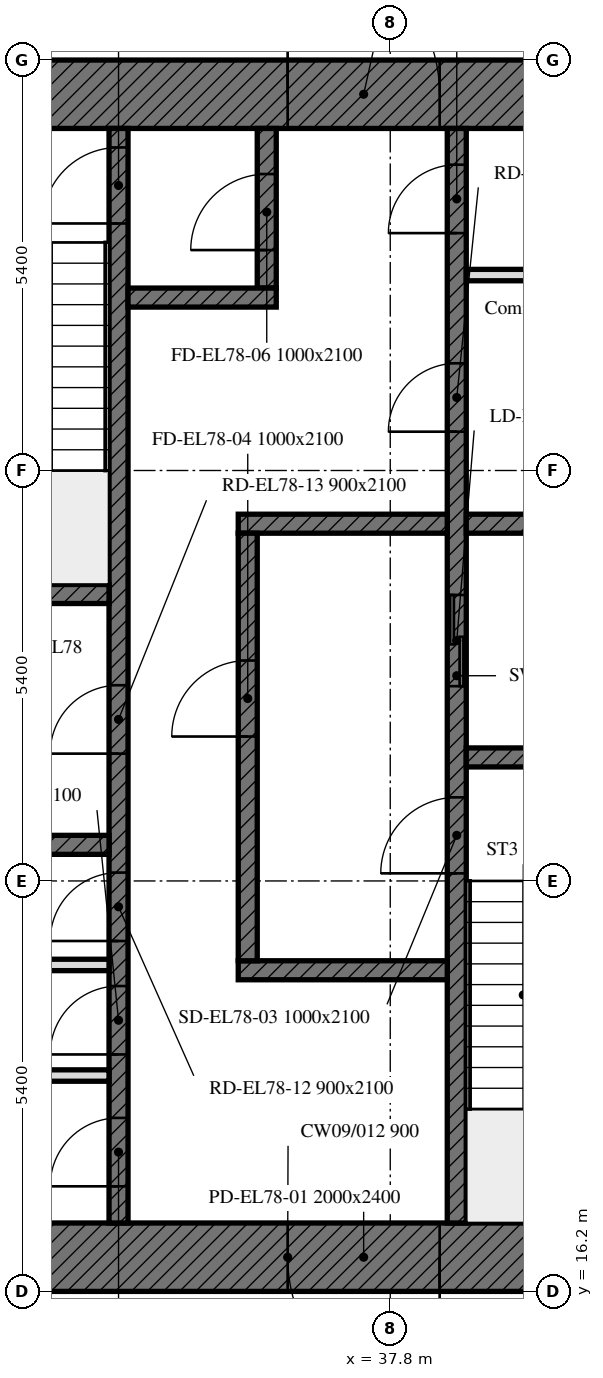
"""IFC4 building model, lengths in metres.
Left out: names, types, materials, properties, quantities, classifications, styles, units other than length and angle.
Written with IfcOpenShell. Run it as: python <this file> out.ifc"""

import sys

from ifc_helpers import new_model, si_unit, direction, frame, frame_2d, origin, place, context, subcontext, project, spatial, rectangle, extrude, element, fill, save


model = new_model("IFC4")
c1 = context("Model", 3, precision=1e-05, world=origin(), true_north=direction((0.0, 1.0)))
c2 = subcontext(c1, "Body", "Model", "MODEL_VIEW")
j1 = project(units=[si_unit("LENGTHUNIT", "METRE"), si_unit("PLANEANGLEUNIT", "RADIAN")], contexts=[c1])
p1 = place(None, origin())
s1 = spatial("IfcSite", under=j1, at=p1, CompositionType="ELEMENT")
p2 = place(p1, origin())
s2 = spatial("IfcBuilding", under=s1, at=p2, CompositionType="ELEMENT")
p3 = place(p2, frame((0.0, 0.0, 312.7)))
s3 = spatial("IfcBuildingStorey", under=s2, at=p3, CompositionType="ELEMENT", Elevation=312.7)
p4 = place(p3, frame((42.0, 16.65, 0.0), z_axis=(0.0, 0.0, 1.0), x_axis=(-1.0, 0.0, 0.0)))
e1 = element("IfcWall", 1, at=p4, inside=s3, PredefinedType="SOLIDWALL", context=c2, shape_type="SweptSolid", body=[
    extrude(rectangle(XDim=11.1, YDim=0.9, at=frame_2d((5.55, 0.0))), origin(), (0.0, 0.0, 1.0), 4.2),
])
p5 = place(p4, frame((3.55, 0.0, 0.0)))
e2 = element("IfcOpeningElement", 2, at=p5, cuts=e1, PredefinedType="OPENING", context=c2, shape_type="SweptSolid", body=[
    extrude(rectangle(XDim=2.0, YDim=2.4, at=frame_2d((1.0, 1.2))), frame((0.0, 0.45, 0.0), z_axis=(0.0, -1.0, 0.0), x_axis=(1.0, 0.0, 0.0)), (0.0, 0.0, 1.0), 0.9),
])
p6 = place(p3, frame((30.9, 31.95, 0.0), z_axis=(0.0, 0.0, 1.0), x_axis=(1.0, 0.0, 0.0)))
e3 = element("IfcWall", 3, at=p6, inside=s3, PredefinedType="SOLIDWALL", context=c2, shape_type="SweptSolid", body=[
    extrude(rectangle(XDim=11.1, YDim=0.9, at=frame_2d((5.55, 0.0))), origin(), (0.0, 0.0, 1.0), 4.2),
])
p7 = place(p6, frame((5.55, 0.0, 0.0)))
e4 = element("IfcOpeningElement", 4, at=p7, cuts=e3, PredefinedType="OPENING", context=c2, shape_type="SweptSolid", body=[
    extrude(rectangle(XDim=2.0, YDim=2.4, at=frame_2d((1.0, 1.2))), frame((0.0, 0.45, 0.0), z_axis=(0.0, -1.0, 0.0), x_axis=(1.0, 0.0, 0.0)), (0.0, 0.0, 1.0), 0.9),
])
p8 = place(p3, frame((38.675, 17.1, 0.0), z_axis=(0.0, 0.0, 1.0), x_axis=(0.0, 1.0, 0.0)))
e5 = element("IfcWall", 5, at=p8, inside=s3, PredefinedType="SOLIDWALL", context=c2, shape_type="SweptSolid", body=[
    extrude(rectangle(XDim=14.4, YDim=0.25, at=frame_2d((7.2, 0.0))), origin(), (0.0, 0.0, 1.0), 4.2),
])
p9 = place(p8, frame((4.6, 0.0, 0.0)))
e6 = element("IfcOpeningElement", 6, at=p9, cuts=e5, PredefinedType="OPENING", context=c2, shape_type="SweptSolid", body=[
    extrude(rectangle(XDim=1.0, YDim=2.1, at=frame_2d((0.5, 1.05))), frame((0.0, 0.125, 0.0), z_axis=(0.0, -1.0, 0.0), x_axis=(1.0, 0.0, 0.0)), (0.0, 0.0, 1.0), 0.25),
])
p10 = place(p8, frame((7.062, 0.0, 0.0)))
e7 = element("IfcOpeningElement", 7, at=p10, cuts=e5, PredefinedType="OPENING", context=c2, shape_type="SweptSolid", body=[
    extrude(rectangle(XDim=1.2, YDim=2.1, at=frame_2d((0.6, 1.05))), frame((0.0, 0.125, 0.0), z_axis=(0.0, -1.0, 0.0), x_axis=(1.0, 0.0, 0.0)), (0.0, 0.0, 1.0), 0.25),
])
p11 = place(p8, frame((10.41, 0.0, 0.0)))
e8 = element("IfcOpeningElement", 8, at=p11, cuts=e5, PredefinedType="OPENING", context=c2, shape_type="SweptSolid", body=[
    extrude(rectangle(XDim=0.9, YDim=2.1, at=frame_2d((0.45, 1.05))), frame((0.0, 0.125, 0.0), z_axis=(0.0, -1.0, 0.0), x_axis=(1.0, 0.0, 0.0)), (0.0, 0.0, 1.0), 0.25),
])
p12 = place(p8, frame((13.023, 0.0, 0.0)))
e9 = element("IfcOpeningElement", 9, at=p12, cuts=e5, PredefinedType="OPENING", context=c2, shape_type="SweptSolid", body=[
    extrude(rectangle(XDim=0.9, YDim=2.1, at=frame_2d((0.45, 1.05))), frame((0.0, 0.125, 0.0), z_axis=(0.0, -1.0, 0.0), x_axis=(1.0, 0.0, 0.0)), (0.0, 0.0, 1.0), 0.25),
])
p13 = place(p3, frame((34.225, 17.1, 0.0), z_axis=(0.0, 0.0, 1.0), x_axis=(0.0, 1.0, 0.0)))
e10 = element("IfcWall", 10, at=p13, inside=s3, PredefinedType="SOLIDWALL", context=c2, shape_type="SweptSolid", body=[
    extrude(rectangle(XDim=14.4, YDim=0.25, at=frame_2d((7.2, 0.0))), origin(), (0.0, 0.0, 1.0), 4.2),
])
p14 = place(p13, frame((13.15, 0.0, 0.0)))
e11 = element("IfcOpeningElement", 11, at=p14, cuts=e10, PredefinedType="OPENING", context=c2, shape_type="SweptSolid", body=[
    extrude(rectangle(XDim=1.0, YDim=2.1, at=frame_2d((0.5, 1.05))), frame((0.0, 0.125, 0.0), z_axis=(0.0, -1.0, 0.0), x_axis=(1.0, 0.0, 0.0)), (0.0, 0.0, 1.0), 0.25),
])
p15 = place(p13, frame((0.482, 0.0, 0.0)))
e12 = element("IfcOpeningElement", 12, at=p15, cuts=e10, PredefinedType="OPENING", context=c2, shape_type="SweptSolid", body=[
    extrude(rectangle(XDim=0.9, YDim=2.1, at=frame_2d((0.45, 1.05))), frame((0.0, 0.125, 0.0), z_axis=(0.0, -1.0, 0.0), x_axis=(1.0, 0.0, 0.0)), (0.0, 0.0, 1.0), 0.25),
])
p16 = place(p13, frame((2.218, 0.0, 0.0)))
e13 = element("IfcOpeningElement", 13, at=p16, cuts=e10, PredefinedType="OPENING", context=c2, shape_type="SweptSolid", body=[
    extrude(rectangle(XDim=0.9, YDim=2.1, at=frame_2d((0.45, 1.05))), frame((0.0, 0.125, 0.0), z_axis=(0.0, -1.0, 0.0), x_axis=(1.0, 0.0, 0.0)), (0.0, 0.0, 1.0), 0.25),
])
p17 = place(p13, frame((3.71, 0.0, 0.0)))
e14 = element("IfcOpeningElement", 14, at=p17, cuts=e10, PredefinedType="OPENING", context=c2, shape_type="SweptSolid", body=[
    extrude(rectangle(XDim=0.9, YDim=2.1, at=frame_2d((0.45, 1.05))), frame((0.0, 0.125, 0.0), z_axis=(0.0, -1.0, 0.0), x_axis=(1.0, 0.0, 0.0)), (0.0, 0.0, 1.0), 0.25),
])
p18 = place(p13, frame((6.175, 0.0, 0.0)))
e15 = element("IfcOpeningElement", 15, at=p18, cuts=e10, PredefinedType="OPENING", context=c2, shape_type="SweptSolid", body=[
    extrude(rectangle(XDim=0.9, YDim=2.1, at=frame_2d((0.45, 1.05))), frame((0.0, 0.125, 0.0), z_axis=(0.0, -1.0, 0.0), x_axis=(1.0, 0.0, 0.0)), (0.0, 0.0, 1.0), 0.25),
])
p19 = place(p3, frame((38.8, 23.225, 0.0), z_axis=(0.0, 0.0, 1.0), x_axis=(1.0, 0.0, 0.0)))
e16 = element("IfcWall", 16, at=p19, inside=s3, PredefinedType="SOLIDWALL", context=c2, shape_type="SweptSolid", body=[
    extrude(rectangle(XDim=3.2, YDim=0.25, at=frame_2d((1.6, 0.0))), origin(), (0.0, 0.0, 1.0), 4.2),
])
for number, where, z_axis, x_axis in (
    (17, (30.9, 25.375, 0.0), (0.0, 0.0, 1.0), (1.0, 0.0, 0.0)),
    (18, (30.9, 22.075, 0.0), (0.0, 0.0, 1.0), (1.0, 0.0, 0.0)),
):
    element("IfcWall", number, at=place(p3, frame(where, z_axis=z_axis, x_axis=x_axis)), inside=s3, PredefinedType="SOLIDWALL", context=c2, shape_type="SweptSolid", body=[
        extrude(rectangle(XDim=3.2, YDim=0.25, at=frame_2d((1.6, 0.0))), origin(), (0.0, 0.0, 1.0), 4.2),
    ])
p20 = place(p3, frame((38.8, 26.3, 0.0), z_axis=(0.0, 0.0, 1.0), x_axis=(1.0, 0.0, 0.0)))
e19 = element("IfcWall", 19, at=p20, inside=s3, PredefinedType="SOLIDWALL", context=c2, shape_type="SweptSolid", body=[
    extrude(rectangle(XDim=3.2, YDim=0.25, at=frame_2d((1.6, 0.0))), origin(), (0.0, 0.0, 1.0), 4.2),
])
for number, where, z_axis, x_axis in (
    (20, (35.8, 26.3, 0.0), (0.0, 0.0, 1.0), (1.0, 0.0, 0.0)),
    (21, (35.8, 20.425, 0.0), (0.0, 0.0, 1.0), (1.0, 0.0, 0.0)),
):
    element("IfcWall", number, at=place(p3, frame(where, z_axis=z_axis, x_axis=x_axis)), inside=s3, PredefinedType="SOLIDWALL", context=c2, shape_type="SweptSolid", body=[
        extrude(rectangle(XDim=2.75, YDim=0.25, at=frame_2d((1.375, 0.0))), origin(), (0.0, 0.0, 1.0), 4.2),
    ])
p21 = place(p3, frame((36.175, 29.4, 0.0), z_axis=(0.0, 0.0, 1.0), x_axis=(0.0, 1.0, 0.0)))
e22 = element("IfcWall", 22, at=p21, inside=s3, PredefinedType="SOLIDWALL", context=c2, shape_type="SweptSolid", body=[
    extrude(rectangle(XDim=2.1, YDim=0.25, at=frame_2d((1.05, 0.0))), origin(), (0.0, 0.0, 1.0), 4.2),
])
p22 = place(p21, frame((0.5, 0.0, 0.0)))
e23 = element("IfcOpeningElement", 23, at=p22, cuts=e22, PredefinedType="OPENING", context=c2, shape_type="SweptSolid", body=[
    extrude(rectangle(XDim=1.0, YDim=2.1, at=frame_2d((0.5, 1.05))), frame((0.0, 0.125, 0.0), z_axis=(0.0, -1.0, 0.0), x_axis=(1.0, 0.0, 0.0)), (0.0, 0.0, 1.0), 0.25),
])
p23 = place(p3, frame((34.35, 29.275, 0.0), z_axis=(0.0, 0.0, 1.0), x_axis=(1.0, 0.0, 0.0)))
e24 = element("IfcWall", 24, at=p23, inside=s3, PredefinedType="SOLIDWALL", context=c2, shape_type="SweptSolid", body=[
    extrude(rectangle(XDim=1.95, YDim=0.25, at=frame_2d((0.975, 0.0))), origin(), (0.0, 0.0, 1.0), 4.2),
])
p24 = place(p3, frame((35.925, 20.55, 0.0), z_axis=(0.0, 0.0, 1.0), x_axis=(0.0, 1.0, 0.0)))
e25 = element("IfcWall", 25, at=p24, inside=s3, PredefinedType="SOLIDWALL", context=c2, shape_type="SweptSolid", body=[
    extrude(rectangle(XDim=5.625, YDim=0.25, at=frame_2d((2.812, 0.0))), origin(), (0.0, 0.0, 1.0), 4.2),
])
p25 = place(p24, frame((2.95, 0.0, 0.0)))
e26 = element("IfcOpeningElement", 26, at=p25, cuts=e25, PredefinedType="OPENING", context=c2, shape_type="SweptSolid", body=[
    extrude(rectangle(XDim=1.0, YDim=2.1, at=frame_2d((0.5, 1.05))), frame((0.0, 0.125, 0.0), z_axis=(0.0, -1.0, 0.0), x_axis=(1.0, 0.0, 0.0)), (0.0, 0.0, 1.0), 0.25),
])
p26 = place(p3, frame((38.8, 29.571, 0.0), z_axis=(0.0, 0.0, 1.0), x_axis=(1.0, 0.0, 0.0)))
e27 = element("IfcWall", 27, at=p26, inside=s3, PredefinedType="PARTITIONING", context=c2, shape_type="SweptSolid", body=[
    extrude(rectangle(XDim=3.2, YDim=0.15, at=frame_2d((1.6, 0.0))), origin(), (0.0, 0.0, 1.0), 4.2),
])
for number, where, z_axis, x_axis in (
    (28, (30.9, 19.04, 0.0), (0.0, 0.0, 1.0), (1.0, 0.0, 0.0)),
    (29, (30.9, 20.495, 0.0), (0.0, 0.0, 1.0), (1.0, 0.0, 0.0)),
):
    element("IfcWall", number, at=place(p3, frame(where, z_axis=z_axis, x_axis=x_axis)), inside=s3, PredefinedType="PARTITIONING", context=c2, shape_type="SweptSolid", body=[
        extrude(rectangle(XDim=3.2, YDim=0.15, at=frame_2d((1.6, 0.0))), origin(), (0.0, 0.0, 1.0), 4.2),
    ])
p27 = place(p5, origin())
e30 = element("IfcDoor", 30, at=p27, inside=s3, OperationType="DOUBLE_DOOR_SINGLE_SWING", PredefinedType="DOOR", context=c2, shape_type="SweptSolid", body=[
    extrude(rectangle(XDim=2.0, YDim=2.4, at=frame_2d((1.0, 1.2))), frame((0.0, 0.025, 0.0), z_axis=(0.0, -1.0, 0.0), x_axis=(1.0, 0.0, 0.0)), (0.0, 0.0, 1.0), 0.05),
])
fill(e2, e30)
p28 = place(p7, origin())
e31 = element("IfcDoor", 31, at=p28, inside=s3, OperationType="DOUBLE_DOOR_SINGLE_SWING", PredefinedType="DOOR", context=c2, shape_type="SweptSolid", body=[
    extrude(rectangle(XDim=2.0, YDim=2.4, at=frame_2d((1.0, 1.2))), frame((0.0, 0.025, 0.0), z_axis=(0.0, -1.0, 0.0), x_axis=(1.0, 0.0, 0.0)), (0.0, 0.0, 1.0), 0.05),
])
fill(e4, e31)
p29 = place(p9, origin())
e32 = element("IfcDoor", 32, at=p29, inside=s3, OperationType="SINGLE_SWING_LEFT", PredefinedType="DOOR", context=c2, shape_type="SweptSolid", body=[
    extrude(rectangle(XDim=1.0, YDim=2.1, at=frame_2d((0.5, 1.05))), frame((0.0, 0.025, 0.0), z_axis=(0.0, -1.0, 0.0), x_axis=(1.0, 0.0, 0.0)), (0.0, 0.0, 1.0), 0.05),
])
fill(e6, e32)
p30 = place(p25, origin())
e33 = element("IfcDoor", 33, at=p30, inside=s3, OperationType="SINGLE_SWING_LEFT", PredefinedType="DOOR", context=c2, shape_type="SweptSolid", body=[
    extrude(rectangle(XDim=1.0, YDim=2.1, at=frame_2d((0.5, 1.05))), frame((0.0, 0.025, 0.0), z_axis=(0.0, -1.0, 0.0), x_axis=(1.0, 0.0, 0.0)), (0.0, 0.0, 1.0), 0.05),
])
fill(e26, e33)
p31 = place(p14, origin())
e34 = element("IfcDoor", 34, at=p31, inside=s3, OperationType="SINGLE_SWING_LEFT", PredefinedType="DOOR", context=c2, shape_type="SweptSolid", body=[
    extrude(rectangle(XDim=1.0, YDim=2.1, at=frame_2d((0.5, 1.05))), frame((0.0, 0.025, 0.0), z_axis=(0.0, -1.0, 0.0), x_axis=(1.0, 0.0, 0.0)), (0.0, 0.0, 1.0), 0.05),
])
fill(e11, e34)
p32 = place(p22, origin())
e35 = element("IfcDoor", 35, at=p32, inside=s3, OperationType="SINGLE_SWING_LEFT", PredefinedType="DOOR", context=c2, shape_type="SweptSolid", body=[
    extrude(rectangle(XDim=1.0, YDim=2.1, at=frame_2d((0.5, 1.05))), frame((0.0, 0.025, 0.0), z_axis=(0.0, -1.0, 0.0), x_axis=(1.0, 0.0, 0.0)), (0.0, 0.0, 1.0), 0.05),
])
fill(e23, e35)
p33 = place(p10, origin())
e36 = element("IfcDoor", 36, at=p33, inside=s3, OperationType="DOUBLE_DOOR_SLIDING", PredefinedType="DOOR", context=c2, shape_type="SweptSolid", body=[
    extrude(rectangle(XDim=1.2, YDim=2.1, at=frame_2d((0.6, 1.05))), frame((0.0, 0.025, 0.0), z_axis=(0.0, -1.0, 0.0), x_axis=(1.0, 0.0, 0.0)), (0.0, 0.0, 1.0), 0.05),
])
fill(e7, e36)
p34 = place(p11, origin())
e37 = element("IfcDoor", 37, at=p34, inside=s3, OperationType="SINGLE_SWING_LEFT", PredefinedType="DOOR", context=c2, shape_type="SweptSolid", body=[
    extrude(rectangle(XDim=0.9, YDim=2.1, at=frame_2d((0.45, 1.05))), frame((0.0, 0.025, 0.0), z_axis=(0.0, -1.0, 0.0), x_axis=(1.0, 0.0, 0.0)), (0.0, 0.0, 1.0), 0.05),
])
fill(e8, e37)
p35 = place(p12, origin())
e38 = element("IfcDoor", 38, at=p35, inside=s3, OperationType="SINGLE_SWING_LEFT", PredefinedType="DOOR", context=c2, shape_type="SweptSolid", body=[
    extrude(rectangle(XDim=0.9, YDim=2.1, at=frame_2d((0.45, 1.05))), frame((0.0, 0.025, 0.0), z_axis=(0.0, -1.0, 0.0), x_axis=(1.0, 0.0, 0.0)), (0.0, 0.0, 1.0), 0.05),
])
fill(e9, e38)
p36 = place(p15, origin())
e39 = element("IfcDoor", 39, at=p36, inside=s3, OperationType="SINGLE_SWING_LEFT", PredefinedType="DOOR", context=c2, shape_type="SweptSolid", body=[
    extrude(rectangle(XDim=0.9, YDim=2.1, at=frame_2d((0.45, 1.05))), frame((0.0, 0.025, 0.0), z_axis=(0.0, -1.0, 0.0), x_axis=(1.0, 0.0, 0.0)), (0.0, 0.0, 1.0), 0.05),
])
fill(e12, e39)
p37 = place(p16, origin())
e40 = element("IfcDoor", 40, at=p37, inside=s3, OperationType="SINGLE_SWING_LEFT", PredefinedType="DOOR", context=c2, shape_type="SweptSolid", body=[
    extrude(rectangle(XDim=0.9, YDim=2.1, at=frame_2d((0.45, 1.05))), frame((0.0, 0.025, 0.0), z_axis=(0.0, -1.0, 0.0), x_axis=(1.0, 0.0, 0.0)), (0.0, 0.0, 1.0), 0.05),
])
fill(e13, e40)
p38 = place(p17, origin())
e41 = element("IfcDoor", 41, at=p38, inside=s3, OperationType="SINGLE_SWING_LEFT", PredefinedType="DOOR", context=c2, shape_type="SweptSolid", body=[
    extrude(rectangle(XDim=0.9, YDim=2.1, at=frame_2d((0.45, 1.05))), frame((0.0, 0.025, 0.0), z_axis=(0.0, -1.0, 0.0), x_axis=(1.0, 0.0, 0.0)), (0.0, 0.0, 1.0), 0.05),
])
fill(e14, e41)
p39 = place(p18, origin())
e42 = element("IfcDoor", 42, at=p39, inside=s3, OperationType="SINGLE_SWING_LEFT", PredefinedType="DOOR", context=c2, shape_type="SweptSolid", body=[
    extrude(rectangle(XDim=0.9, YDim=2.1, at=frame_2d((0.45, 1.05))), frame((0.0, 0.025, 0.0), z_axis=(0.0, -1.0, 0.0), x_axis=(1.0, 0.0, 0.0)), (0.0, 0.0, 1.0), 0.05),
])
fill(e15, e42)
save(model, sys.argv[1])
